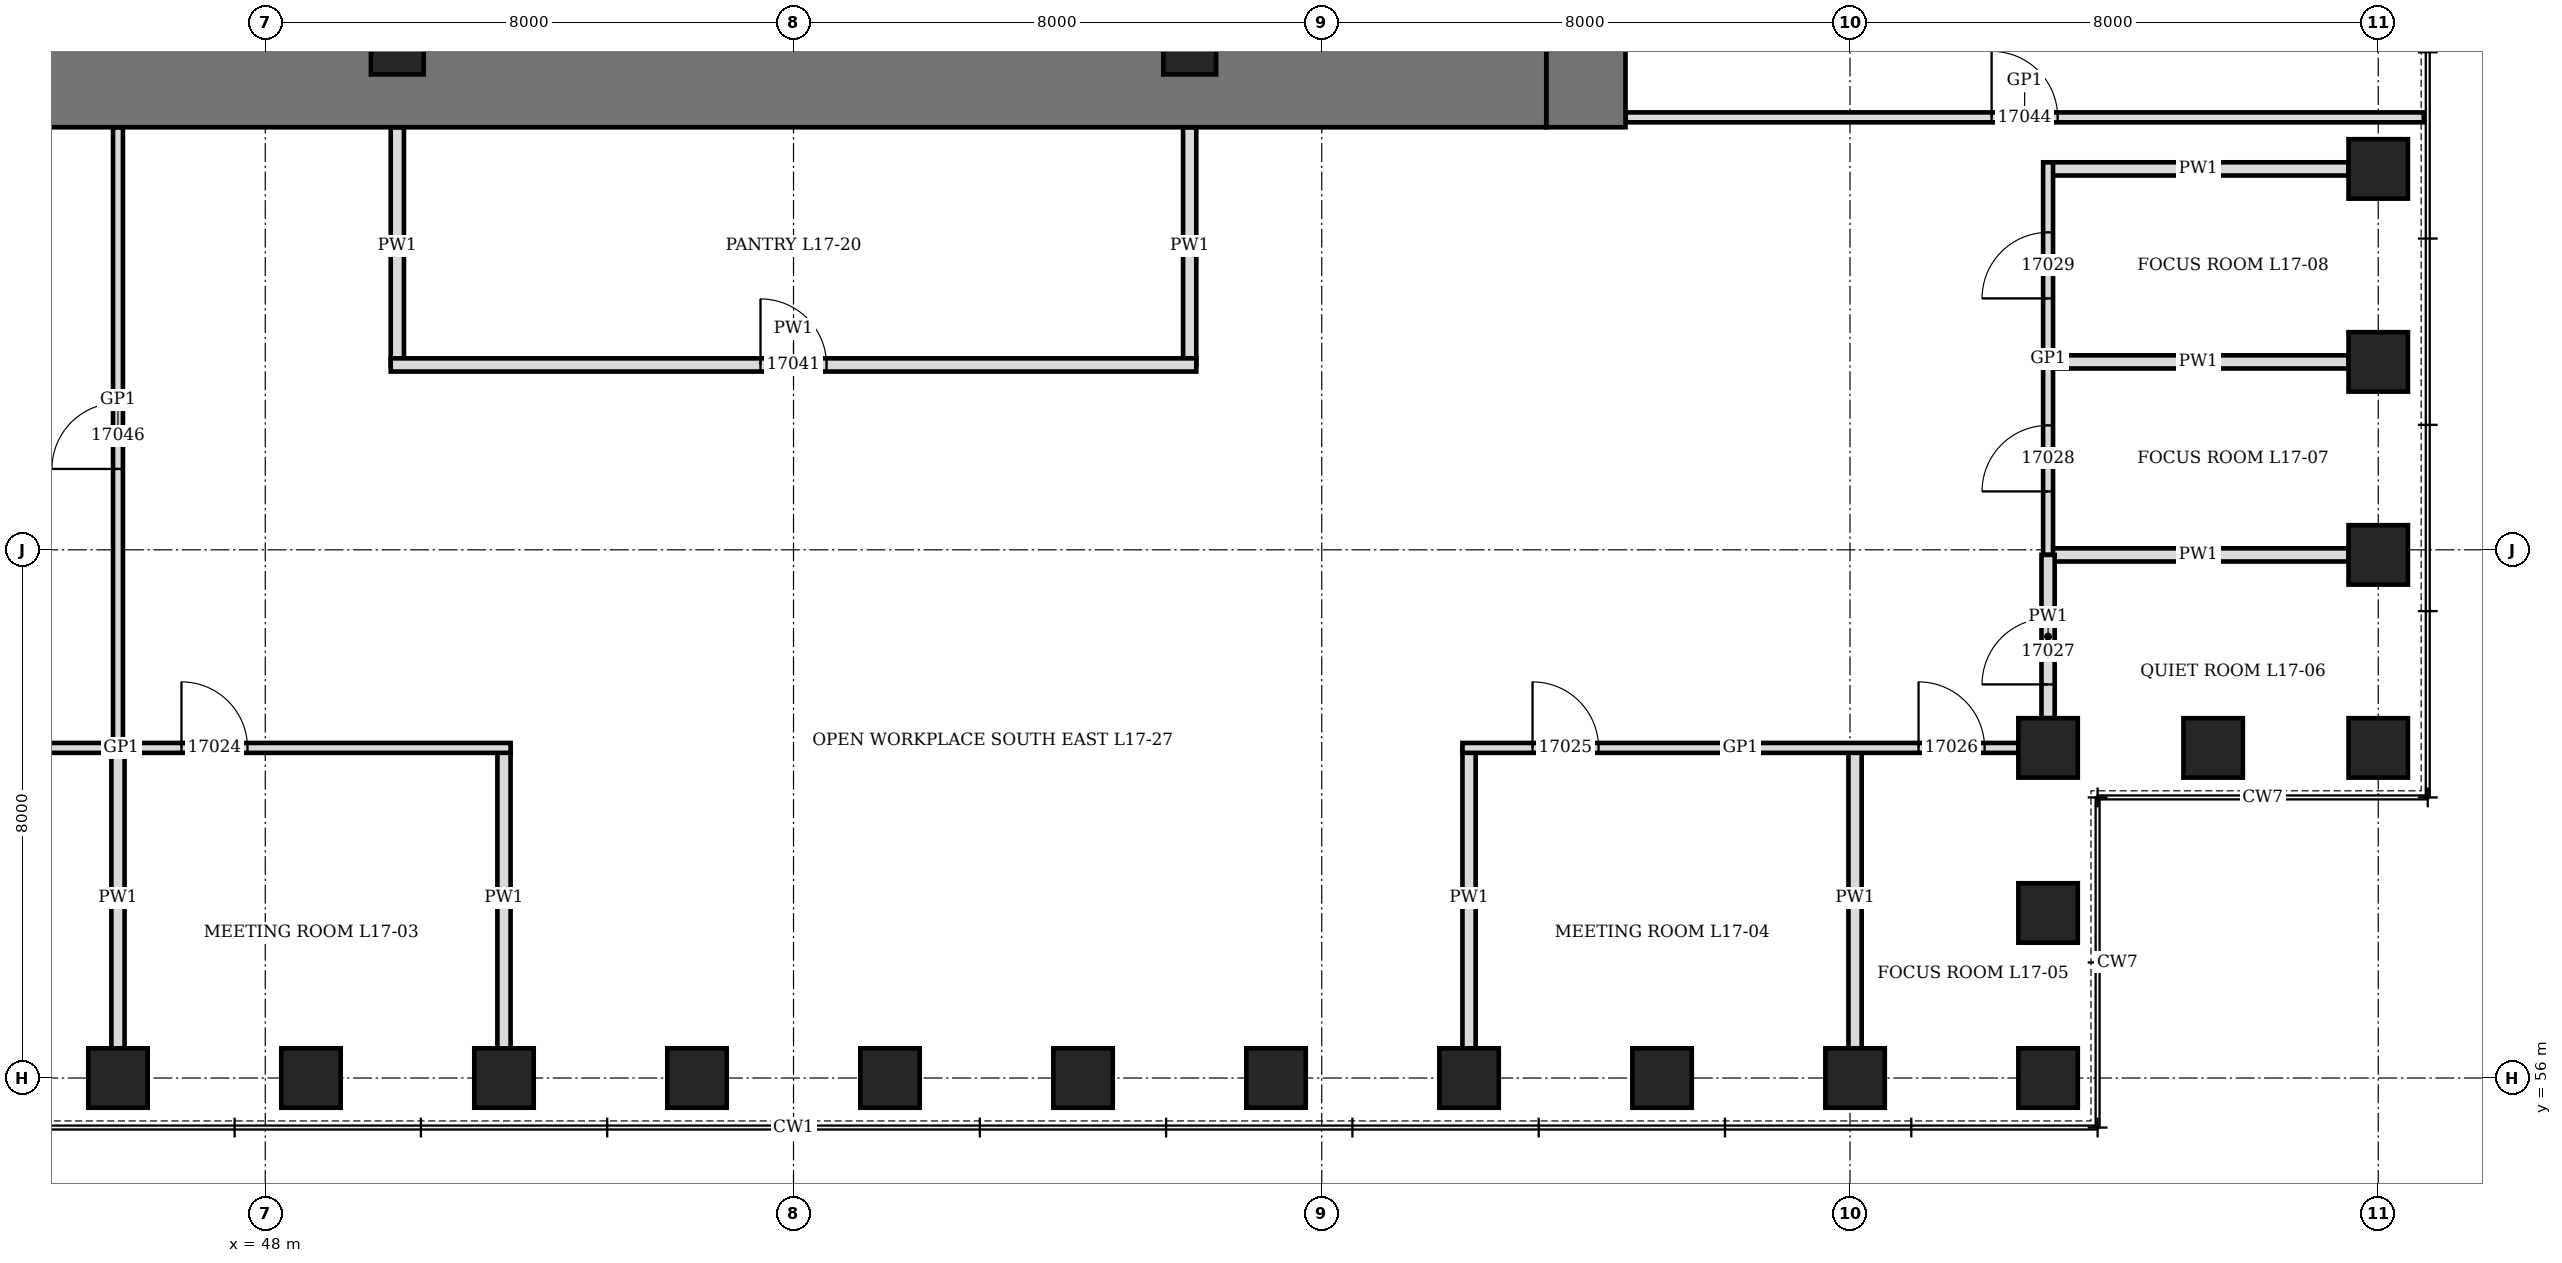
"""IFC4 building model, lengths in metres.
Left out: names, types, materials, properties, quantities, classifications, styles, units other than length and angle.
Written with IfcOpenShell. Run it as: python <this file> out.ifc"""

import sys

from ifc_helpers import new_model, si_unit, direction, frame, frame_2d, origin, origin_2d, place, context, subcontext, project, spatial, rectangle, hollow_rectangle, extrude, element, fill, save


model = new_model("IFC4")
c1 = context("Model", 3, precision=1e-05, world=origin(), true_north=direction((0.0, 1.0)))
c2 = subcontext(c1, "Body", "Model", "MODEL_VIEW")
j1 = project(units=[si_unit("LENGTHUNIT", "METRE"), si_unit("PLANEANGLEUNIT", "RADIAN")], contexts=[c1])
p1 = place(None, origin())
s1 = spatial("IfcSite", under=j1, at=p1, CompositionType="ELEMENT")
p2 = place(p1, origin())
s2 = spatial("IfcBuilding", under=s1, at=p2, CompositionType="ELEMENT")
p3 = place(p2, frame((0.0, 0.0, 81.1)))
s3 = spatial("IfcBuildingStorey", under=s2, at=p3, CompositionType="ELEMENT", Elevation=81.1)
for number, where, z_axis, x_axis in (
    (1, (45.769, 56.0, 0.0), (0.0, 0.0, 1.0), (1.0, 0.0, 0.0)),
    (2, (48.692, 56.0, 0.0), (0.0, 0.0, 1.0), (1.0, 0.0, 0.0)),
    (3, (51.615, 56.0, 0.0), (0.0, 0.0, 1.0), (1.0, 0.0, 0.0)),
    (4, (54.539, 56.0, 0.0), (0.0, 0.0, 1.0), (1.0, 0.0, 0.0)),
    (5, (57.461, 56.0, 0.0), (0.0, 0.0, 1.0), (1.0, 0.0, 0.0)),
    (6, (60.385, 56.0, 0.0), (0.0, 0.0, 1.0), (1.0, 0.0, 0.0)),
    (7, (63.308, 56.0, 0.0), (0.0, 0.0, 1.0), (1.0, 0.0, 0.0)),
    (8, (66.231, 56.0, 0.0), (0.0, 0.0, 1.0), (1.0, 0.0, 0.0)),
    (9, (69.154, 56.0, 0.0), (0.0, 0.0, 1.0), (1.0, 0.0, 0.0)),
    (10, (72.077, 56.0, 0.0), (0.0, 0.0, 1.0), (1.0, 0.0, 0.0)),
    (11, (75.0, 56.0, 0.0), (0.0, 0.0, 1.0), (0.0, 1.0, 0.0)),
    (12, (75.0, 58.5, 0.0), (0.0, 0.0, 1.0), (0.0, 1.0, 0.0)),
    (13, (75.0, 61.0, 0.0), (0.0, 0.0, 1.0), (1.0, 0.0, 0.0)),
    (14, (77.5, 61.0, 0.0), (0.0, 0.0, 1.0), (1.0, 0.0, 0.0)),
    (15, (80.0, 61.0, 0.0), (0.0, 0.0, 1.0), (0.0, 1.0, 0.0)),
    (16, (80.0, 63.923, 0.0), (0.0, 0.0, 1.0), (0.0, 1.0, 0.0)),
    (17, (80.0, 66.846, 0.0), (0.0, 0.0, 1.0), (0.0, 1.0, 0.0)),
    (18, (80.0, 69.769, 0.0), (0.0, 0.0, 1.0), (0.0, 1.0, 0.0)),
):
    element("IfcColumn", number, at=place(p3, frame(where, z_axis=z_axis, x_axis=x_axis)), inside=s3, PredefinedType="COLUMN", context=c2, shape_type="SweptSolid", body=[
        extrude(hollow_rectangle(XDim=0.9, YDim=0.9, WallThickness=0.12, at=origin_2d()), origin(), (0.0, 0.0, 1.0), 4.2),
    ])
p4 = place(p3, frame((68.0, 70.4, 0.0), z_axis=(0.0, 0.0, 1.0), x_axis=(0.0, 1.0, 0.0)))
e19 = element("IfcWall", 19, at=p4, inside=s3, PredefinedType="SHEAR", context=c2, shape_type="SweptSolid", body=[
    extrude(rectangle(XDim=19.2, YDim=1.2, at=frame_2d((9.6, 0.0))), origin(), (0.0, 0.0, 1.0), 4.2),
])
p5 = place(p4, frame((8.6, 0.0, 0.0)))
e20 = element("IfcOpeningElement", 20, at=p5, cuts=e19, PredefinedType="OPENING", context=c2, shape_type="SweptSolid", body=[
    extrude(rectangle(XDim=2.0, YDim=2.4, at=frame_2d((1.0, 1.2))), frame((0.0, 0.61, 0.0), z_axis=(0.0, -1.0, 0.0), x_axis=(1.0, 0.0, 0.0)), (0.0, 0.0, 1.0), 1.22),
])
p6 = place(p3, frame((44.6, 71.0, 0.0), z_axis=(0.0, 0.0, 1.0), x_axis=(1.0, 0.0, 0.0)))
e21 = element("IfcWall", 21, at=p6, inside=s3, PredefinedType="SHEAR", context=c2, shape_type="SweptSolid", body=[
    extrude(rectangle(XDim=22.8, YDim=1.2, at=frame_2d((11.4, 0.0))), origin(), (0.0, 0.0, 1.0), 4.2),
])
for number, where, z_axis, x_axis in (
    (22, (50.0, 71.6, 0.0), (0.0, 0.0, 1.0), (1.0, 0.0, 0.0)),
    (23, (62.0, 71.6, 0.0), (0.0, 0.0, 1.0), (1.0, 0.0, 0.0)),
):
    element("IfcColumn", number, at=place(p3, frame(where, z_axis=z_axis, x_axis=x_axis)), inside=s3, PredefinedType="COLUMN", context=c2, shape_type="SweptSolid", body=[
        extrude(hollow_rectangle(XDim=0.8, YDim=0.8, WallThickness=0.1, at=origin_2d()), origin(), (0.0, 0.0, 1.0), 4.2),
    ])
for number, where, z_axis, x_axis in (
    (24, (45.769, 56.45, 0.0), (0.0, 0.0, 1.0), (0.0, 1.0, 0.0)),
    (25, (51.615, 56.45, 0.0), (0.0, 0.0, 1.0), (0.0, 1.0, 0.0)),
    (26, (66.231, 56.45, 0.0), (0.0, 0.0, 1.0), (0.0, 1.0, 0.0)),
):
    element("IfcWall", number, at=place(p3, frame(where, z_axis=z_axis, x_axis=x_axis)), inside=s3, PredefinedType="PARTITIONING", context=c2, shape_type="SweptSolid", body=[
        extrude(rectangle(XDim=4.55, YDim=0.2, at=frame_2d((2.275, 0.0))), origin(), (0.0, 0.0, 1.0), 3.278),
    ])
for number, where, z_axis, x_axis in (
    (27, (72.077, 56.45, 0.0), (0.0, 0.0, 1.0), (0.0, 1.0, 0.0)),
    (28, (75.0, 63.923, 0.0), (0.0, 0.0, 1.0), (1.0, 0.0, 0.0)),
    (29, (75.0, 66.846, 0.0), (0.0, 0.0, 1.0), (1.0, 0.0, 0.0)),
    (30, (75.0, 69.769, 0.0), (0.0, 0.0, 1.0), (1.0, 0.0, 0.0)),
):
    element("IfcWall", number, at=place(p3, frame(where, z_axis=z_axis, x_axis=x_axis)), inside=s3, PredefinedType="PARTITIONING", context=c2, shape_type="SweptSolid", body=[
        extrude(rectangle(XDim=4.55, YDim=0.2, at=frame_2d((2.275, 0.0))), origin(), (0.0, 0.0, 1.0), 3.428),
    ])
for number, where, z_axis, x_axis in (
    (31, (50.0, 66.8, 0.0), (0.0, 0.0, 1.0), (0.0, 1.0, 0.0)),
    (32, (62.0, 66.8, 0.0), (0.0, 0.0, 1.0), (0.0, 1.0, 0.0)),
):
    element("IfcWall", number, at=place(p3, frame(where, z_axis=z_axis, x_axis=x_axis)), inside=s3, PredefinedType="PARTITIONING", context=c2, shape_type="SweptSolid", body=[
        extrude(rectangle(XDim=3.6, YDim=0.2, at=frame_2d((1.8, 0.0))), origin(), (0.0, 0.0, 1.0), 4.04),
    ])
p7 = place(p3, frame((39.923, 61.0, 0.0), z_axis=(0.0, 0.0, 1.0), x_axis=(1.0, 0.0, 0.0)))
e33 = element("IfcWall", 33, at=p7, inside=s3, PredefinedType="PARTITIONING", context=c2, shape_type="SweptSolid", body=[
    extrude(rectangle(XDim=11.792, YDim=0.15, at=frame_2d((5.896, 0.0))), origin(), (0.0, 0.0, 1.0), 4.04),
])
p8 = place(p7, frame((0.961, 0.0, 0.0)))
e34 = element("IfcOpeningElement", 34, at=p8, cuts=e33, PredefinedType="OPENING", context=c2, shape_type="SweptSolid", body=[
    extrude(rectangle(XDim=1.0, YDim=2.4, at=frame_2d((0.5, 1.2))), frame((0.0, 0.085, 0.0), z_axis=(0.0, -1.0, 0.0), x_axis=(1.0, 0.0, 0.0)), (0.0, 0.0, 1.0), 0.17),
])
p9 = place(p7, frame((6.808, 0.0, 0.0)))
e35 = element("IfcOpeningElement", 35, at=p9, cuts=e33, PredefinedType="OPENING", context=c2, shape_type="SweptSolid", body=[
    extrude(rectangle(XDim=1.0, YDim=2.4, at=frame_2d((0.5, 1.2))), frame((0.0, 0.085, 0.0), z_axis=(0.0, -1.0, 0.0), x_axis=(1.0, 0.0, 0.0)), (0.0, 0.0, 1.0), 0.17),
])
p10 = place(p3, frame((66.131, 61.0, 0.0), z_axis=(0.0, 0.0, 1.0), x_axis=(1.0, 0.0, 0.0)))
e36 = element("IfcWall", 36, at=p10, inside=s3, PredefinedType="PARTITIONING", context=c2, shape_type="SweptSolid", body=[
    extrude(rectangle(XDim=8.419, YDim=0.15, at=frame_2d((4.209, 0.0))), origin(), (0.0, 0.0, 1.0), 4.04),
])
p11 = place(p10, frame((1.062, 0.0, 0.0)))
e37 = element("IfcOpeningElement", 37, at=p11, cuts=e36, PredefinedType="OPENING", context=c2, shape_type="SweptSolid", body=[
    extrude(rectangle(XDim=1.0, YDim=2.4, at=frame_2d((0.5, 1.2))), frame((0.0, 0.085, 0.0), z_axis=(0.0, -1.0, 0.0), x_axis=(1.0, 0.0, 0.0)), (0.0, 0.0, 1.0), 0.17),
])
p12 = place(p10, frame((6.908, 0.0, 0.0)))
e38 = element("IfcOpeningElement", 38, at=p12, cuts=e36, PredefinedType="OPENING", context=c2, shape_type="SweptSolid", body=[
    extrude(rectangle(XDim=1.0, YDim=2.4, at=frame_2d((0.5, 1.2))), frame((0.0, 0.085, 0.0), z_axis=(0.0, -1.0, 0.0), x_axis=(1.0, 0.0, 0.0)), (0.0, 0.0, 1.0), 0.17),
])
p13 = place(p3, frame((49.9, 66.8, 0.0), z_axis=(0.0, 0.0, 1.0), x_axis=(1.0, 0.0, 0.0)))
e39 = element("IfcWall", 39, at=p13, inside=s3, PredefinedType="PARTITIONING", context=c2, shape_type="SweptSolid", body=[
    extrude(rectangle(XDim=12.2, YDim=0.2, at=frame_2d((6.1, 0.0))), origin(), (0.0, 0.0, 1.0), 4.04),
])
p14 = place(p13, frame((5.6, 0.0, 0.0)))
e40 = element("IfcOpeningElement", 40, at=p14, cuts=e39, PredefinedType="OPENING", context=c2, shape_type="SweptSolid", body=[
    extrude(rectangle(XDim=1.0, YDim=2.1, at=frame_2d((0.5, 1.05))), frame((0.0, 0.11, 0.0), z_axis=(0.0, -1.0, 0.0), x_axis=(1.0, 0.0, 0.0)), (0.0, 0.0, 1.0), 0.22),
])
p15 = place(p3, frame((68.6, 70.55, 0.0), z_axis=(0.0, 0.0, 1.0), x_axis=(1.0, 0.0, 0.0)))
e41 = element("IfcWall", 41, at=p15, inside=s3, PredefinedType="PARTITIONING", context=c2, shape_type="SweptSolid", body=[
    extrude(rectangle(XDim=12.09, YDim=0.15, at=frame_2d((6.045, 0.0))), origin(), (0.0, 0.0, 1.0), 4.04),
])
p16 = place(p15, frame((5.545, 0.0, 0.0)))
e42 = element("IfcOpeningElement", 42, at=p16, cuts=e41, PredefinedType="OPENING", context=c2, shape_type="SweptSolid", body=[
    extrude(rectangle(XDim=1.0, YDim=2.4, at=frame_2d((0.5, 1.2))), frame((0.0, 0.085, 0.0), z_axis=(0.0, -1.0, 0.0), x_axis=(1.0, 0.0, 0.0)), (0.0, 0.0, 1.0), 0.17),
])
p17 = place(p3, frame((45.769, 61.05, 0.0), z_axis=(0.0, 0.0, 1.0), x_axis=(0.0, 1.0, 0.0)))
e43 = element("IfcWall", 43, at=p17, inside=s3, PredefinedType="PARTITIONING", context=c2, shape_type="SweptSolid", body=[
    extrude(rectangle(XDim=9.35, YDim=0.15, at=frame_2d((4.675, 0.0))), origin(), (0.0, 0.0, 1.0), 3.278),
])
p18 = place(p17, frame((4.175, 0.0, 0.0)))
e44 = element("IfcOpeningElement", 44, at=p18, cuts=e43, PredefinedType="OPENING", context=c2, shape_type="SweptSolid", body=[
    extrude(rectangle(XDim=1.0, YDim=2.4, at=frame_2d((0.5, 1.2))), frame((0.0, 0.085, 0.0), z_axis=(0.0, -1.0, 0.0), x_axis=(1.0, 0.0, 0.0)), (0.0, 0.0, 1.0), 0.17),
])
p19 = place(p3, frame((75.0, 63.923, 0.0), z_axis=(0.0, 0.0, 1.0), x_axis=(0.0, 1.0, 0.0)))
e45 = element("IfcWall", 45, at=p19, inside=s3, PredefinedType="PARTITIONING", context=c2, shape_type="SweptSolid", body=[
    extrude(rectangle(XDim=5.946, YDim=0.15, at=frame_2d((2.973, 0.0))), origin(), (0.0, 0.0, 1.0), 4.04),
])
p20 = place(p19, frame((0.961, 0.0, 0.0)))
e46 = element("IfcOpeningElement", 46, at=p20, cuts=e45, PredefinedType="OPENING", context=c2, shape_type="SweptSolid", body=[
    extrude(rectangle(XDim=1.0, YDim=2.4, at=frame_2d((0.5, 1.2))), frame((0.0, 0.085, 0.0), z_axis=(0.0, -1.0, 0.0), x_axis=(1.0, 0.0, 0.0)), (0.0, 0.0, 1.0), 0.17),
])
p21 = place(p19, frame((3.885, 0.0, 0.0)))
e47 = element("IfcOpeningElement", 47, at=p21, cuts=e45, PredefinedType="OPENING", context=c2, shape_type="SweptSolid", body=[
    extrude(rectangle(XDim=1.0, YDim=2.4, at=frame_2d((0.5, 1.2))), frame((0.0, 0.085, 0.0), z_axis=(0.0, -1.0, 0.0), x_axis=(1.0, 0.0, 0.0)), (0.0, 0.0, 1.0), 0.17),
])
p22 = place(p3, frame((75.0, 61.45, 0.0), z_axis=(0.0, 0.0, 1.0), x_axis=(0.0, 1.0, 0.0)))
e48 = element("IfcWall", 48, at=p22, inside=s3, PredefinedType="PARTITIONING", context=c2, shape_type="SweptSolid", body=[
    extrude(rectangle(XDim=2.473, YDim=0.2, at=frame_2d((1.237, 0.0))), origin(), (0.0, 0.0, 1.0), 4.04),
])
p23 = place(p22, frame((0.511, 0.0, 0.0)))
e49 = element("IfcOpeningElement", 49, at=p23, cuts=e48, PredefinedType="OPENING", context=c2, shape_type="SweptSolid", body=[
    extrude(rectangle(XDim=1.0, YDim=2.1, at=frame_2d((0.5, 1.05))), frame((0.0, 0.11, 0.0), z_axis=(0.0, -1.0, 0.0), x_axis=(1.0, 0.0, 0.0)), (0.0, 0.0, 1.0), 0.22),
])
p24 = place(p9, origin())
e50 = element("IfcDoor", 50, at=p24, inside=s3, OperationType="SINGLE_SWING_RIGHT", PredefinedType="DOOR", context=c2, shape_type="SweptSolid", body=[
    extrude(rectangle(XDim=1.0, YDim=2.4, at=frame_2d((0.5, 1.2))), frame((0.0, 0.075, 0.0), z_axis=(0.0, -1.0, 0.0), x_axis=(1.0, 0.0, 0.0)), (0.0, 0.0, 1.0), 0.149),
])
fill(e35, e50)
p25 = place(p11, origin())
e51 = element("IfcDoor", 51, at=p25, inside=s3, OperationType="SINGLE_SWING_RIGHT", PredefinedType="DOOR", context=c2, shape_type="SweptSolid", body=[
    extrude(rectangle(XDim=1.0, YDim=2.4, at=frame_2d((0.5, 1.2))), frame((0.0, 0.075, 0.0), z_axis=(0.0, -1.0, 0.0), x_axis=(1.0, 0.0, 0.0)), (0.0, 0.0, 1.0), 0.149),
])
fill(e37, e51)
p26 = place(p12, origin())
e52 = element("IfcDoor", 52, at=p26, inside=s3, OperationType="SINGLE_SWING_RIGHT", PredefinedType="DOOR", context=c2, shape_type="SweptSolid", body=[
    extrude(rectangle(XDim=1.0, YDim=2.4, at=frame_2d((0.5, 1.2))), frame((0.0, 0.075, 0.0), z_axis=(0.0, -1.0, 0.0), x_axis=(1.0, 0.0, 0.0)), (0.0, 0.0, 1.0), 0.149),
])
fill(e38, e52)
p27 = place(p23, origin())
e53 = element("IfcDoor", 53, at=p27, inside=s3, OperationType="SINGLE_SWING_LEFT", PredefinedType="DOOR", context=c2, shape_type="SweptSolid", body=[
    extrude(rectangle(XDim=1.0, YDim=2.1, at=frame_2d((0.5, 1.05))), frame((0.0, 0.1, 0.0), z_axis=(0.0, -1.0, 0.0), x_axis=(1.0, 0.0, 0.0)), (0.0, 0.0, 1.0), 0.199),
])
fill(e49, e53)
p28 = place(p20, origin())
e54 = element("IfcDoor", 54, at=p28, inside=s3, OperationType="SINGLE_SWING_RIGHT", PredefinedType="DOOR", context=c2, shape_type="SweptSolid", body=[
    extrude(rectangle(XDim=1.0, YDim=2.4, at=frame_2d((0.5, 1.2))), frame((0.0, 0.075, 0.0), z_axis=(0.0, -1.0, 0.0), x_axis=(1.0, 0.0, 0.0)), (0.0, 0.0, 1.0), 0.149),
])
fill(e46, e54)
p29 = place(p21, origin())
e55 = element("IfcDoor", 55, at=p29, inside=s3, OperationType="SINGLE_SWING_RIGHT", PredefinedType="DOOR", context=c2, shape_type="SweptSolid", body=[
    extrude(rectangle(XDim=1.0, YDim=2.4, at=frame_2d((0.5, 1.2))), frame((0.0, 0.075, 0.0), z_axis=(0.0, -1.0, 0.0), x_axis=(1.0, 0.0, 0.0)), (0.0, 0.0, 1.0), 0.149),
])
fill(e47, e55)
p30 = place(p14, origin())
e56 = element("IfcDoor", 56, at=p30, inside=s3, OperationType="SINGLE_SWING_LEFT", PredefinedType="DOOR", context=c2, shape_type="SweptSolid", body=[
    extrude(rectangle(XDim=1.0, YDim=2.1, at=frame_2d((0.5, 1.05))), frame((0.0, 0.1, 0.0), z_axis=(0.0, -1.0, 0.0), x_axis=(1.0, 0.0, 0.0)), (0.0, 0.0, 1.0), 0.199),
])
fill(e40, e56)
p31 = place(p16, origin())
e57 = element("IfcDoor", 57, at=p31, inside=s3, OperationType="SINGLE_SWING_RIGHT", PredefinedType="DOOR", context=c2, shape_type="SweptSolid", body=[
    extrude(rectangle(XDim=1.0, YDim=2.4, at=frame_2d((0.5, 1.2))), frame((0.0, 0.075, 0.0), z_axis=(0.0, -1.0, 0.0), x_axis=(1.0, 0.0, 0.0)), (0.0, 0.0, 1.0), 0.149),
])
fill(e42, e57)
p32 = place(p18, origin())
e58 = element("IfcDoor", 58, at=p32, inside=s3, OperationType="SINGLE_SWING_RIGHT", PredefinedType="DOOR", context=c2, shape_type="SweptSolid", body=[
    extrude(rectangle(XDim=1.0, YDim=2.4, at=frame_2d((0.5, 1.2))), frame((0.0, 0.075, 0.0), z_axis=(0.0, -1.0, 0.0), x_axis=(1.0, 0.0, 0.0)), (0.0, 0.0, 1.0), 0.149),
])
fill(e44, e58)
save(model, sys.argv[1])
